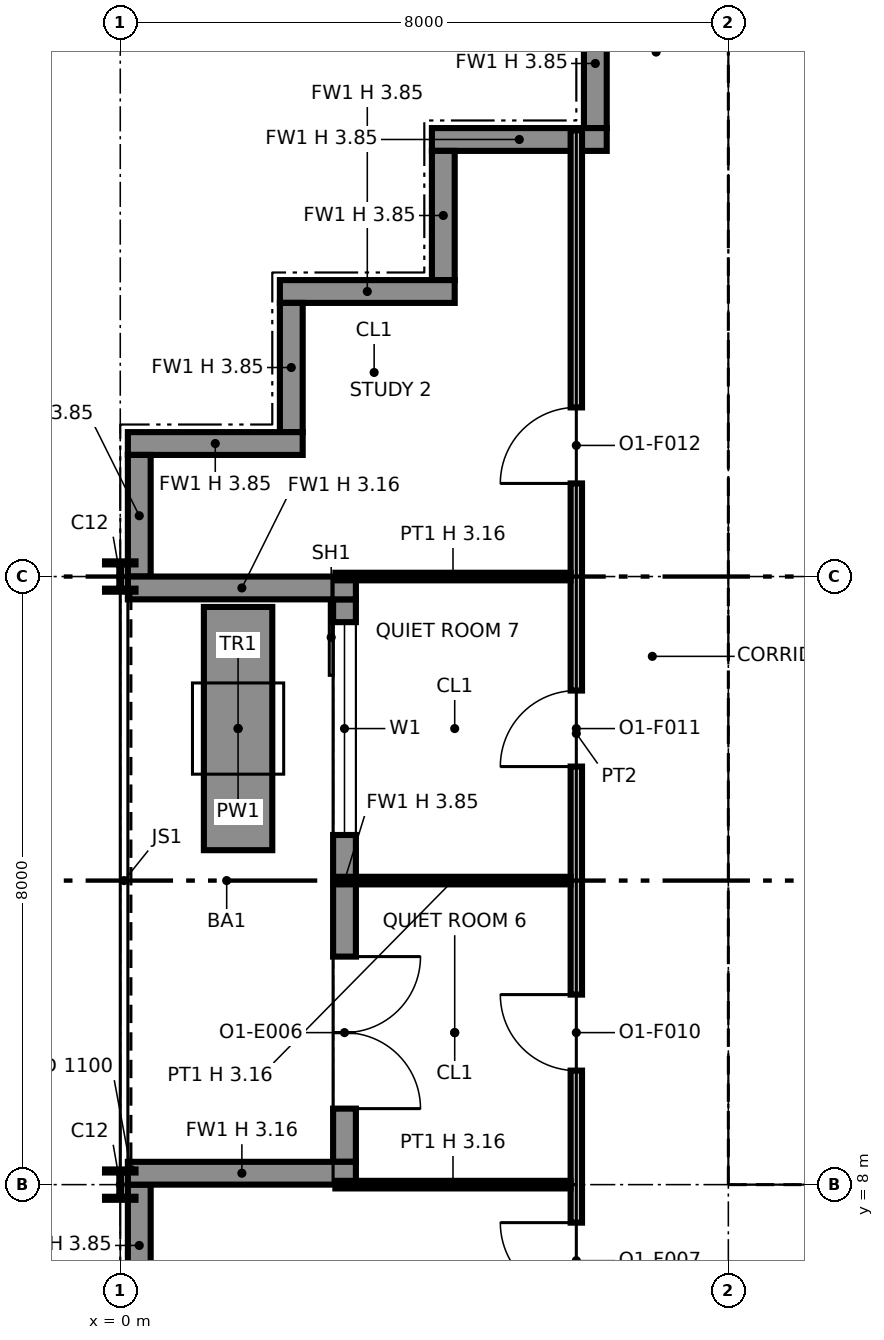
"""IFC4 building model, lengths in metres.
Left out: names, types, materials, properties, quantities, classifications, styles, units other than length and angle.
Written with IfcOpenShell. Run it as: python <this file> out.ifc"""

import sys

from ifc_helpers import new_model, si_unit, direction, frame, frame_2d, origin, origin_2d, place, context, subcontext, project, spatial, polyline, rectangle, i_section, outline, extrude, element, fill, save


model = new_model("IFC4")
c1 = context("Model", 3, precision=1e-05, world=origin(), true_north=direction((0.0, 1.0)))
c2 = subcontext(c1, "Body", "Model", "MODEL_VIEW")
j1 = project(units=[si_unit("LENGTHUNIT", "METRE"), si_unit("PLANEANGLEUNIT", "RADIAN")], contexts=[c1])
p1 = place(None, origin())
s1 = spatial("IfcSite", under=j1, at=p1, CompositionType="ELEMENT")
p2 = place(p1, origin())
s2 = spatial("IfcBuilding", under=s1, at=p2, CompositionType="ELEMENT")
p3 = place(p2, frame((0.0, 0.0, 197.0)))
s3 = spatial("IfcBuildingStorey", under=s2, at=p3, CompositionType="ELEMENT", Elevation=197.0)
for number, where, z_axis, x_axis in (
    (1, (0.0, 8.0, 0.0), (0.0, 0.0, 1.0), (1.0, 0.0, 0.0)),
    (2, (0.0, 16.0, 0.0), (0.0, 0.0, 1.0), (1.0, 0.0, 0.0)),
):
    element("IfcColumn", number, at=place(p3, frame(where, z_axis=z_axis, x_axis=x_axis)), inside=s3, PredefinedType="COLUMN", context=c2, shape_type="SweptSolid", body=[
        extrude(i_section(OverallWidth=0.401, OverallDepth=0.399, WebThickness=0.025, FlangeThickness=0.04, at=origin_2d()), origin(), (0.0, 0.0, 1.0), 3.85),
    ])
for number, where, z_axis, x_axis in (
    (3, (8.0, 8.0, 0.0), (0.0, 0.0, 1.0), (1.0, 0.0, 0.0)),
    (4, (8.0, 16.0, 0.0), (0.0, 0.0, 1.0), (1.0, 0.0, 0.0)),
):
    element("IfcColumn", number, at=place(p3, frame(where, z_axis=z_axis, x_axis=x_axis)), inside=s3, PredefinedType="COLUMN", context=c2, shape_type="SweptSolid", body=[
        extrude(i_section(OverallWidth=0.394, OverallDepth=0.376, WebThickness=0.017, FlangeThickness=0.028, at=origin_2d()), origin(), (0.0, 0.0, 1.0), 3.85),
    ])
p4 = place(p3, frame((6.25, 23.6, 0.0), z_axis=(0.0, 0.0, 1.0), x_axis=(0.0, -1.0, 0.0)))
e5 = element("IfcWall", 5, at=p4, inside=s3, PredefinedType="SOLIDWALL", context=c2, shape_type="SweptSolid", body=[
    extrude(rectangle(XDim=1.7, YDim=0.3, at=frame_2d((0.85, 0.0))), origin(), (0.0, 0.0, 1.0), 3.85),
])
p5 = place(p3, frame((6.4, 21.75, 0.0), z_axis=(0.0, 0.0, 1.0), x_axis=(-1.0, 0.0, 0.0)))
e6 = element("IfcWall", 6, at=p5, inside=s3, PredefinedType="SOLIDWALL", context=c2, shape_type="SweptSolid", body=[
    extrude(rectangle(XDim=2.3, YDim=0.3, at=frame_2d((1.15, 0.0))), origin(), (0.0, 0.0, 1.0), 3.85),
])
p6 = place(p3, frame((4.25, 21.6, 0.0), z_axis=(0.0, 0.0, 1.0), x_axis=(0.0, -1.0, 0.0)))
e7 = element("IfcWall", 7, at=p6, inside=s3, PredefinedType="SOLIDWALL", context=c2, shape_type="SweptSolid", body=[
    extrude(rectangle(XDim=1.7, YDim=0.3, at=frame_2d((0.85, 0.0))), origin(), (0.0, 0.0, 1.0), 3.85),
])
p7 = place(p3, frame((4.4, 19.75, 0.0), z_axis=(0.0, 0.0, 1.0), x_axis=(-1.0, 0.0, 0.0)))
e8 = element("IfcWall", 8, at=p7, inside=s3, PredefinedType="SOLIDWALL", context=c2, shape_type="SweptSolid", body=[
    extrude(rectangle(XDim=2.3, YDim=0.3, at=frame_2d((1.15, 0.0))), origin(), (0.0, 0.0, 1.0), 3.85),
])
p8 = place(p3, frame((2.25, 19.6, 0.0), z_axis=(0.0, 0.0, 1.0), x_axis=(0.0, -1.0, 0.0)))
e9 = element("IfcWall", 9, at=p8, inside=s3, PredefinedType="SOLIDWALL", context=c2, shape_type="SweptSolid", body=[
    extrude(rectangle(XDim=1.7, YDim=0.3, at=frame_2d((0.85, 0.0))), origin(), (0.0, 0.0, 1.0), 3.85),
])
p9 = place(p3, frame((2.4, 17.75, 0.0), z_axis=(0.0, 0.0, 1.0), x_axis=(-1.0, 0.0, 0.0)))
e10 = element("IfcWall", 10, at=p9, inside=s3, PredefinedType="SOLIDWALL", context=c2, shape_type="SweptSolid", body=[
    extrude(rectangle(XDim=2.3, YDim=0.3, at=frame_2d((1.15, 0.0))), origin(), (0.0, 0.0, 1.0), 3.85),
])
p10 = place(p3, frame((0.25, 17.6, 0.0), z_axis=(0.0, 0.0, 1.0), x_axis=(0.0, -1.0, 0.0)))
e11 = element("IfcWall", 11, at=p10, inside=s3, PredefinedType="SOLIDWALL", context=c2, shape_type="SweptSolid", body=[
    extrude(rectangle(XDim=1.6, YDim=0.3, at=frame_2d((0.8, 0.0))), origin(), (0.0, 0.0, 1.0), 3.85),
])
p11 = place(p3, frame((2.95, 15.7, 0.0), z_axis=(0.0, 0.0, 1.0), x_axis=(0.0, -1.0, 0.0)))
e12 = element("IfcWall", 12, at=p11, inside=s3, PredefinedType="SOLIDWALL", context=c2, shape_type="SweptSolid", body=[
    extrude(rectangle(XDim=7.4, YDim=0.3, at=frame_2d((3.7, 0.0))), origin(), (0.0, 0.0, 1.0), 3.85),
])
p12 = place(p11, frame((0.3, 0.0, 0.9)))
e13 = element("IfcOpeningElement", 13, at=p12, cuts=e12, PredefinedType="OPENING", context=c2, shape_type="SweptSolid", body=[
    extrude(rectangle(XDim=2.8, YDim=2.2, at=frame_2d((1.4, 1.1))), frame((0.0, 0.16, 0.0), z_axis=(0.0, -1.0, 0.0), x_axis=(1.0, 0.0, 0.0)), (0.0, 0.0, 1.0), 0.32),
])
p13 = place(p11, frame((4.7, 0.0, 0.0)))
e14 = element("IfcOpeningElement", 14, at=p13, cuts=e12, PredefinedType="OPENING", context=c2, shape_type="SweptSolid", body=[
    extrude(rectangle(XDim=2.0, YDim=2.4, at=frame_2d((1.0, 1.2))), frame((0.0, 0.16, 0.0), z_axis=(0.0, -1.0, 0.0), x_axis=(1.0, 0.0, 0.0)), (0.0, 0.0, 1.0), 0.32),
])
for number, where, z_axis, x_axis in (
    (15, (0.1, 15.85, 0.0), (0.0, 0.0, 1.0), (1.0, 0.0, 0.0)),
    (16, (0.1, 8.15, 0.0), (0.0, 0.0, 1.0), (1.0, 0.0, 0.0)),
):
    element("IfcWall", number, at=place(p3, frame(where, z_axis=z_axis, x_axis=x_axis)), inside=s3, PredefinedType="SOLIDWALL", context=c2, shape_type="SweptSolid", body=[
        extrude(rectangle(XDim=3.0, YDim=0.3, at=frame_2d((1.5, 0.0))), origin(), (0.0, 0.0, 1.0), 3.156),
    ])
p14 = place(p3, frame((0.25, 8.0, 0.0), z_axis=(0.0, 0.0, 1.0), x_axis=(0.0, -1.0, 0.0)))
e17 = element("IfcWall", 17, at=p14, inside=s3, PredefinedType="SOLIDWALL", context=c2, shape_type="SweptSolid", body=[
    extrude(rectangle(XDim=1.6, YDim=0.3, at=frame_2d((0.8, 0.0))), origin(), (0.0, 0.0, 1.0), 3.85),
])
p15 = place(p3, frame((1.55, 15.6, 0.0), z_axis=(0.0, 0.0, 1.0), x_axis=(0.0, -1.0, 0.0)))
e18 = element("IfcWall", 18, at=p15, inside=s3, PredefinedType="SOLIDWALL", context=c2, shape_type="SweptSolid", body=[
    extrude(rectangle(XDim=3.2, YDim=0.9, at=frame_2d((1.6, 0.0))), origin(), (0.0, 0.0, 1.0), 0.6),
])
p16 = place(p3, frame((8.65, 8.75, 0.0), z_axis=(0.0, 0.0, 1.0), x_axis=(1.0, 0.0, 0.0)))
e19 = element("IfcWall", 19, at=p16, inside=s3, PredefinedType="PARTITIONING", context=c2, shape_type="SweptSolid", body=[
    extrude(outline(polyline([(0.0, 0.0), (14.7, 0.0), (14.7, 3.85), (7.469, 3.85), (7.468, 3.242), (7.232, 3.242), (7.231, 3.85), (0.0, 3.85), (0.0, 0.0)])), frame((0.0, 0.1, 0.0), z_axis=(0.0, -1.0, 0.0), x_axis=(1.0, 0.0, 0.0)), (0.0, 0.0, 1.0), 0.2),
])
p17 = place(p16, frame((1.3, 0.0, 0.0)))
e20 = element("IfcOpeningElement", 20, at=p17, cuts=e19, PredefinedType="OPENING", context=c2, shape_type="SweptSolid", body=[
    extrude(rectangle(XDim=1.4, YDim=2.1, at=frame_2d((0.7, 1.05))), frame((0.0, 0.11, 0.0), z_axis=(0.0, -1.0, 0.0), x_axis=(1.0, 0.0, 0.0)), (0.0, 0.0, 1.0), 0.22),
])
p18 = place(p16, frame((4.6, 0.0, 0.0)))
e21 = element("IfcOpeningElement", 21, at=p18, cuts=e19, PredefinedType="OPENING", context=c2, shape_type="SweptSolid", body=[
    extrude(rectangle(XDim=1.4, YDim=2.1, at=frame_2d((0.7, 1.05))), frame((0.0, 0.11, 0.0), z_axis=(0.0, -1.0, 0.0), x_axis=(1.0, 0.0, 0.0)), (0.0, 0.0, 1.0), 0.22),
])
p19 = place(p16, frame((10.4, 0.0, 0.0)))
e22 = element("IfcOpeningElement", 22, at=p19, cuts=e19, PredefinedType="OPENING", context=c2, shape_type="SweptSolid", body=[
    extrude(rectangle(XDim=1.2, YDim=2.1, at=frame_2d((0.6, 1.05))), frame((0.0, 0.11, 0.0), z_axis=(0.0, -1.0, 0.0), x_axis=(1.0, 0.0, 0.0)), (0.0, 0.0, 1.0), 0.22),
])
p20 = place(p3, frame((8.75, 8.85, 0.0), z_axis=(0.0, 0.0, 1.0), x_axis=(0.0, 1.0, 0.0)))
e23 = element("IfcWall", 23, at=p20, inside=s3, PredefinedType="PARTITIONING", context=c2, shape_type="SweptSolid", body=[
    extrude(outline(polyline([(0.0, 0.0), (14.3, 0.0), (14.3, 3.85), (10.231, 3.85), (10.23, 3.389), (10.07, 3.389), (10.069, 3.85), (7.269, 3.85), (7.268, 3.242), (7.032, 3.242), (7.031, 3.85), (0.0, 3.85), (0.0, 0.0)])), frame((0.0, 0.1, 0.0), z_axis=(0.0, -1.0, 0.0), x_axis=(1.0, 0.0, 0.0)), (0.0, 0.0, 1.0), 0.2),
])
p21 = place(p20, frame((8.3, 0.0, 0.0)))
e24 = element("IfcOpeningElement", 24, at=p21, cuts=e23, PredefinedType="OPENING", context=c2, shape_type="SweptSolid", body=[
    extrude(rectangle(XDim=1.8, YDim=2.1, at=frame_2d((0.9, 1.05))), frame((0.0, 0.11, 0.0), z_axis=(0.0, -1.0, 0.0), x_axis=(1.0, 0.0, 0.0)), (0.0, 0.0, 1.0), 0.22),
])
p22 = place(p3, frame((8.85, 16.0, 0.0), z_axis=(0.0, 0.0, 1.0), x_axis=(1.0, 0.0, 0.0)))
e25 = element("IfcWall", 25, at=p22, inside=s3, PredefinedType="PARTITIONING", context=c2, shape_type="SweptSolid", body=[
    extrude(rectangle(XDim=6.943, YDim=0.6, at=frame_2d((3.471, 0.0))), origin(), (0.0, 0.0, 1.0), 3.242),
])
p23 = place(p3, frame((8.85, 19.9, 0.0), z_axis=(0.0, 0.0, 1.0), x_axis=(1.0, 0.0, 0.0)))
e26 = element("IfcWall", 26, at=p23, inside=s3, PredefinedType="PARTITIONING", context=c2, shape_type="SweptSolid", body=[
    extrude(outline(polyline([(0.0, 0.0), (14.3, 0.0), (14.3, 3.85), (7.269, 3.85), (7.268, 3.242), (7.032, 3.242), (7.031, 3.85), (0.0, 3.85), (0.0, 0.0)])), frame((0.0, 0.1, 0.0), z_axis=(0.0, -1.0, 0.0), x_axis=(1.0, 0.0, 0.0)), (0.0, 0.0, 1.0), 0.2),
])
p24 = place(p23, frame((2.125, 0.0, 0.0)))
e27 = element("IfcOpeningElement", 27, at=p24, cuts=e26, PredefinedType="OPENING", context=c2, shape_type="SweptSolid", body=[
    extrude(rectangle(XDim=0.9, YDim=2.1, at=frame_2d((0.45, 1.05))), frame((0.0, 0.11, 0.0), z_axis=(0.0, -1.0, 0.0), x_axis=(1.0, 0.0, 0.0)), (0.0, 0.0, 1.0), 0.22),
])
p25 = place(p23, frame((5.65, 0.0, 0.0)))
e28 = element("IfcOpeningElement", 28, at=p25, cuts=e26, PredefinedType="OPENING", context=c2, shape_type="SweptSolid", body=[
    extrude(rectangle(XDim=1.1, YDim=2.1, at=frame_2d((0.55, 1.05))), frame((0.0, 0.11, 0.0), z_axis=(0.0, -1.0, 0.0), x_axis=(1.0, 0.0, 0.0)), (0.0, 0.0, 1.0), 0.22),
])
p26 = place(p23, frame((7.95, 0.0, 0.0)))
e29 = element("IfcOpeningElement", 29, at=p26, cuts=e26, PredefinedType="OPENING", context=c2, shape_type="SweptSolid", body=[
    extrude(rectangle(XDim=1.1, YDim=2.1, at=frame_2d((0.55, 1.05))), frame((0.0, 0.11, 0.0), z_axis=(0.0, -1.0, 0.0), x_axis=(1.0, 0.0, 0.0)), (0.0, 0.0, 1.0), 0.22),
])
p27 = place(p23, frame((10.25, 0.0, 0.0)))
e30 = element("IfcOpeningElement", 30, at=p27, cuts=e26, PredefinedType="OPENING", context=c2, shape_type="SweptSolid", body=[
    extrude(rectangle(XDim=1.1, YDim=2.1, at=frame_2d((0.55, 1.05))), frame((0.0, 0.11, 0.0), z_axis=(0.0, -1.0, 0.0), x_axis=(1.0, 0.0, 0.0)), (0.0, 0.0, 1.0), 0.22),
])
p28 = place(p23, frame((12.625, 0.0, 0.0)))
e31 = element("IfcOpeningElement", 31, at=p28, cuts=e26, PredefinedType="OPENING", context=c2, shape_type="SweptSolid", body=[
    extrude(rectangle(XDim=1.1, YDim=2.1, at=frame_2d((0.55, 1.05))), frame((0.0, 0.11, 0.0), z_axis=(0.0, -1.0, 0.0), x_axis=(1.0, 0.0, 0.0)), (0.0, 0.0, 1.0), 0.22),
])
p29 = place(p3, frame((6.0, 6.0, 0.0), z_axis=(0.0, 0.0, 1.0), x_axis=(0.0, 1.0, 0.0)))
e32 = element("IfcWall", 32, at=p29, inside=s3, PredefinedType="PARTITIONING", context=c2, shape_type="SweptSolid", body=[
    extrude(outline(polyline([(0.0, 0.0), (15.87, 0.0), (15.87, 3.85), (14.3, 3.85), (14.298, 3.157), (13.702, 3.157), (13.7, 3.85), (10.3, 3.85), (10.298, 3.157), (9.702, 3.157), (9.7, 3.85), (6.3, 3.85), (6.298, 3.157), (5.702, 3.157), (5.7, 3.85), (2.3, 3.85), (2.298, 3.157), (1.702, 3.157), (1.7, 3.85), (0.0, 3.85), (0.0, 0.0)])), frame((0.0, 0.075, 0.0), z_axis=(0.0, -1.0, 0.0), x_axis=(1.0, 0.0, 0.0)), (0.0, 0.0, 1.0), 0.15),
])
p30 = place(p29, frame((0.5, 0.0, 0.0)))
e33 = element("IfcOpeningElement", 33, at=p30, cuts=e32, PredefinedType="OPENING", context=c2, shape_type="SweptSolid", body=[
    extrude(rectangle(XDim=1.0, YDim=2.1, at=frame_2d((0.5, 1.05))), frame((0.0, 0.085, 0.0), z_axis=(0.0, -1.0, 0.0), x_axis=(1.0, 0.0, 0.0)), (0.0, 0.0, 1.0), 0.17),
])
p31 = place(p29, frame((3.5, 0.0, 0.0)))
e34 = element("IfcOpeningElement", 34, at=p31, cuts=e32, PredefinedType="OPENING", context=c2, shape_type="SweptSolid", body=[
    extrude(rectangle(XDim=1.0, YDim=2.1, at=frame_2d((0.5, 1.05))), frame((0.0, 0.085, 0.0), z_axis=(0.0, -1.0, 0.0), x_axis=(1.0, 0.0, 0.0)), (0.0, 0.0, 1.0), 0.17),
])
p32 = place(p29, frame((7.5, 0.0, 0.0)))
e35 = element("IfcOpeningElement", 35, at=p32, cuts=e32, PredefinedType="OPENING", context=c2, shape_type="SweptSolid", body=[
    extrude(rectangle(XDim=1.0, YDim=2.1, at=frame_2d((0.5, 1.05))), frame((0.0, 0.085, 0.0), z_axis=(0.0, -1.0, 0.0), x_axis=(1.0, 0.0, 0.0)), (0.0, 0.0, 1.0), 0.17),
])
p33 = place(p29, frame((11.225, 0.0, 0.0)))
e36 = element("IfcOpeningElement", 36, at=p33, cuts=e32, PredefinedType="OPENING", context=c2, shape_type="SweptSolid", body=[
    extrude(rectangle(XDim=1.0, YDim=2.1, at=frame_2d((0.5, 1.05))), frame((0.0, 0.085, 0.0), z_axis=(0.0, -1.0, 0.0), x_axis=(1.0, 0.0, 0.0)), (0.0, 0.0, 1.0), 0.17),
])
for number, where, z_axis, x_axis in (
    (37, (2.83, 8.0, 0.0), (0.0, 0.0, 1.0), (1.0, 0.0, 0.0)),
    (38, (2.83, 12.0, 0.0), (0.0, 0.0, 1.0), (1.0, 0.0, 0.0)),
    (39, (2.83, 16.0, 0.0), (0.0, 0.0, 1.0), (1.0, 0.0, 0.0)),
):
    element("IfcWall", number, at=place(p3, frame(where, z_axis=z_axis, x_axis=x_axis)), inside=s3, PredefinedType="PARTITIONING", context=c2, shape_type="SweptSolid", body=[
        extrude(rectangle(XDim=3.095, YDim=0.1, at=frame_2d((1.547, 0.0))), origin(), (0.0, 0.0, 1.0), 3.157),
    ])
p34 = place(p12, origin())
e40 = element("IfcWindow", 40, at=p34, inside=s3, PartitioningType="SINGLE_PANEL", PredefinedType="WINDOW", context=c2, shape_type="SweptSolid", body=[
    extrude(rectangle(XDim=2.8, YDim=2.2, at=frame_2d((1.4, 1.1))), frame((0.0, 0.03, 0.0), z_axis=(0.0, -1.0, 0.0), x_axis=(1.0, 0.0, 0.0)), (0.0, 0.0, 1.0), 0.06),
])
fill(e13, e40)
p35 = place(p13, origin())
e41 = element("IfcDoor", 41, at=p35, inside=s3, OperationType="DOUBLE_DOOR_SINGLE_SWING", PredefinedType="DOOR", context=c2, shape_type="SweptSolid", body=[
    extrude(rectangle(XDim=2.0, YDim=2.4, at=frame_2d((1.0, 1.2))), frame((0.0, 0.025, 0.0), z_axis=(0.0, -1.0, 0.0), x_axis=(1.0, 0.0, 0.0)), (0.0, 0.0, 1.0), 0.05),
])
fill(e14, e41)
p36 = place(p21, origin())
e42 = element("IfcDoor", 42, at=p36, inside=s3, OperationType="DOUBLE_DOOR_SINGLE_SWING", PredefinedType="NOTDEFINED", context=c2, shape_type="SweptSolid", body=[
    extrude(rectangle(XDim=1.8, YDim=2.1, at=frame_2d((0.9, 1.05))), frame((0.0, 0.025, 0.0), z_axis=(0.0, -1.0, 0.0), x_axis=(1.0, 0.0, 0.0)), (0.0, 0.0, 1.0), 0.05),
])
fill(e24, e42)
p37 = place(p30, origin())
e43 = element("IfcDoor", 43, at=p37, inside=s3, OperationType="SINGLE_SWING_RIGHT", PredefinedType="DOOR", context=c2, shape_type="SweptSolid", body=[
    extrude(rectangle(XDim=1.0, YDim=2.1, at=frame_2d((0.5, 1.05))), frame((0.0, 0.025, 0.0), z_axis=(0.0, -1.0, 0.0), x_axis=(1.0, 0.0, 0.0)), (0.0, 0.0, 1.0), 0.05),
])
fill(e33, e43)
p38 = place(p31, origin())
e44 = element("IfcDoor", 44, at=p38, inside=s3, OperationType="SINGLE_SWING_RIGHT", PredefinedType="DOOR", context=c2, shape_type="SweptSolid", body=[
    extrude(rectangle(XDim=1.0, YDim=2.1, at=frame_2d((0.5, 1.05))), frame((0.0, 0.025, 0.0), z_axis=(0.0, -1.0, 0.0), x_axis=(1.0, 0.0, 0.0)), (0.0, 0.0, 1.0), 0.05),
])
fill(e34, e44)
p39 = place(p32, origin())
e45 = element("IfcDoor", 45, at=p39, inside=s3, OperationType="SINGLE_SWING_LEFT", PredefinedType="DOOR", context=c2, shape_type="SweptSolid", body=[
    extrude(rectangle(XDim=1.0, YDim=2.1, at=frame_2d((0.5, 1.05))), frame((0.0, 0.025, 0.0), z_axis=(0.0, -1.0, 0.0), x_axis=(1.0, 0.0, 0.0)), (0.0, 0.0, 1.0), 0.05),
])
fill(e35, e45)
p40 = place(p33, origin())
e46 = element("IfcDoor", 46, at=p40, inside=s3, OperationType="SINGLE_SWING_LEFT", PredefinedType="DOOR", context=c2, shape_type="SweptSolid", body=[
    extrude(rectangle(XDim=1.0, YDim=2.1, at=frame_2d((0.5, 1.05))), frame((0.0, 0.025, 0.0), z_axis=(0.0, -1.0, 0.0), x_axis=(1.0, 0.0, 0.0)), (0.0, 0.0, 1.0), 0.05),
])
fill(e36, e46)
save(model, sys.argv[1])
